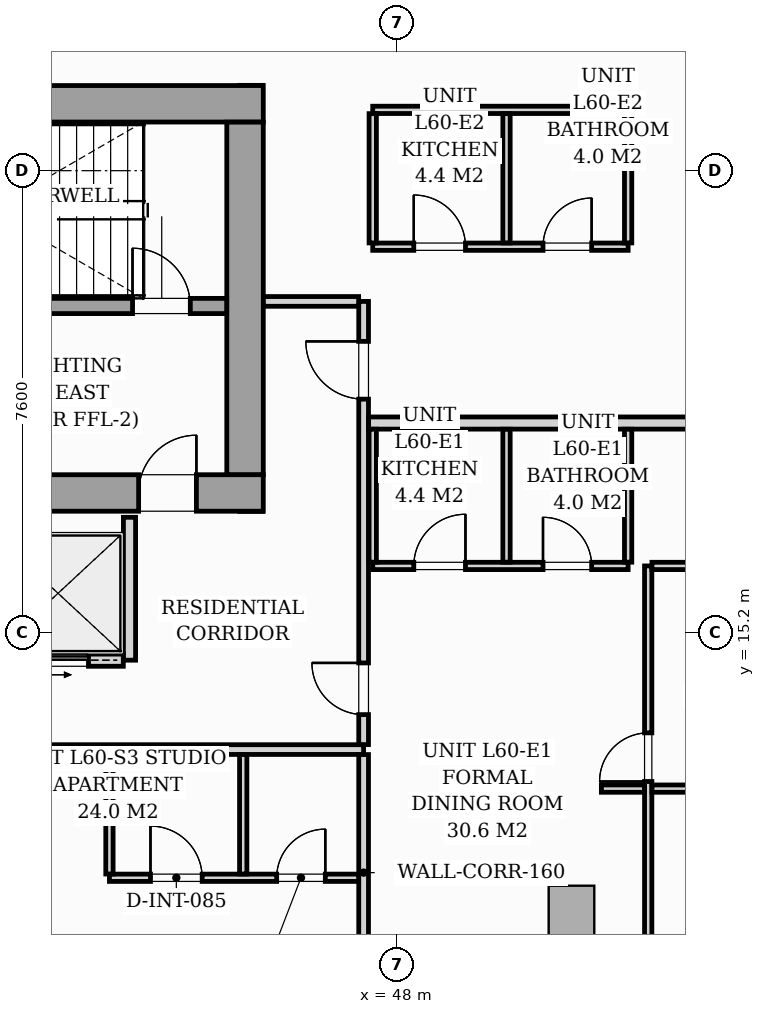
"""IFC4 building model, lengths in metres.
Left out: names, types, materials, properties, quantities, classifications, styles, units other than length and angle.
Written with IfcOpenShell. Run it as: python <this file> out.ifc"""

import sys

from ifc_helpers import new_model, si_unit, direction, frame, frame_2d, origin, origin_2d, place, context, subcontext, project, spatial, rectangle, i_section, extrude, source, transform, mapped, element, fill, save


model = new_model("IFC4")
c1 = context("Model", 3, precision=1e-05, world=origin(), true_north=direction((0.0, 1.0)))
c2 = subcontext(c1, "Body", "Model", "MODEL_VIEW")
j1 = project(units=[si_unit("LENGTHUNIT", "METRE"), si_unit("PLANEANGLEUNIT", "RADIAN")], contexts=[c1])
p1 = place(None, origin())
s1 = spatial("IfcSite", under=j1, at=p1, CompositionType="ELEMENT")
p2 = place(p1, origin())
s2 = spatial("IfcBuilding", under=s1, at=p2, CompositionType="ELEMENT")
p3 = place(p2, frame((0.0, 0.0, 208.2)))
s3 = spatial("IfcBuildingStorey", under=s2, at=p3, CompositionType="ELEMENT", Elevation=208.2)
m1 = source(origin(), c2, "Body", "SweptSolid", [
    extrude(i_section(OverallWidth=0.416, OverallDepth=0.446, WebThickness=0.039, FlangeThickness=0.063, FilletRadius=0.018, at=origin_2d()), origin(), (0.0, 0.0, 1.0), 3.196),
])
for number, where, z_axis, x_axis in (
    (1, (45.6, 17.4, 0.002), (0.0, 0.0, 1.0), (1.0, 0.0, 0.0)),
    (2, (45.6, 24.0, 0.002), (0.0, 0.0, 1.0), (1.0, 0.0, 0.0)),
):
    element("IfcColumn", number, at=place(p3, frame(where, z_axis=z_axis, x_axis=x_axis)), inside=s3, PredefinedType="PILASTER", context=c2, shape_type="MappedRepresentation", body=[
        mapped(m1, transform((0.0, 0.0, 0.0), scale=1.0)),
    ])
m2 = source(origin(), c2, "Body", "SweptSolid", [
    extrude(rectangle(XDim=0.75, YDim=0.95, at=origin_2d()), origin(), (0.0, 0.0, 1.0), 3.194),
])
p4 = place(p3, frame((50.868, 10.566, 0.002), z_axis=(0.0, 0.0, 1.0), x_axis=(0.995396198367, 0.09584575252, 0.0)))
e3 = element("IfcColumn", 3, at=p4, inside=s3, PredefinedType="COLUMN", context=c2, shape_type="MappedRepresentation", body=[
    mapped(m2, transform((0.0, 0.0, 0.0), scale=1.0)),
])
p5 = place(p3, frame((62.963, 10.676, 0.0), z_axis=(0.0, 0.0, 1.0), x_axis=(-0.995395627913, -0.095851676732, 0.0)))
e4 = element("IfcWall", 4, at=p5, inside=s3, PredefinedType="STANDARD", context=c2, shape_type="SweptSolid", body=[
    extrude(rectangle(XDim=16.1, YDim=0.26, at=frame_2d((8.05, 0.0))), origin(), (0.0, 0.0, 1.0), 2.9),
])
p6 = place(p5, frame((7.78, 0.0, 0.0)))
e5 = element("IfcOpeningElement", 5, at=p6, cuts=e4, PredefinedType="OPENING", context=c2, shape_type="SweptSolid", body=[
    extrude(rectangle(XDim=1.8, YDim=2.06, at=frame_2d((0.9, 1.03))), frame((0.0, 0.14, 0.0), z_axis=(0.0, -1.0, 0.0), x_axis=(1.0, 0.0, 0.0)), (0.0, 0.0, 1.0), 0.28),
])
p7 = place(p5, frame((2.05, 0.0, 0.65)))
e6 = element("IfcOpeningElement", 6, at=p7, cuts=e4, PredefinedType="OPENING", context=c2, shape_type="SweptSolid", body=[
    extrude(rectangle(XDim=1.6, YDim=1.5, at=frame_2d((0.8, 0.75))), frame((0.0, 0.14, 0.0), z_axis=(0.0, -1.0, 0.0), x_axis=(1.0, 0.0, 0.0)), (0.0, 0.0, 1.0), 0.28),
])
p8 = place(p3, frame((26.2, 17.5, 0.0), z_axis=(0.0, 0.0, 1.0), x_axis=(1.0, 0.0, 0.0)))
e7 = element("IfcWall", 7, at=p8, inside=s3, PredefinedType="SHEAR", context=c2, shape_type="SweptSolid", body=[
    extrude(rectangle(XDim=19.6, YDim=0.6, at=frame_2d((9.8, 0.0))), origin(), (0.0, 0.0, 1.0), 3.2),
])
p9 = place(p8, frame((0.95, 0.0, 0.0)))
e8 = element("IfcOpeningElement", 8, at=p9, cuts=e7, PredefinedType="OPENING", context=c2, shape_type="SweptSolid", body=[
    extrude(rectangle(XDim=0.95, YDim=2.06, at=frame_2d((0.475, 1.03))), frame((0.0, 0.31, 0.0), z_axis=(0.0, -1.0, 0.0), x_axis=(1.0, 0.0, 0.0)), (0.0, 0.0, 1.0), 0.62),
])
p10 = place(p8, frame((9.38, 0.0, 0.0)))
e9 = element("IfcOpeningElement", 9, at=p10, cuts=e7, PredefinedType="OPENING", context=c2, shape_type="SweptSolid", body=[
    extrude(rectangle(XDim=0.85, YDim=2.0, at=frame_2d((0.425, 1.0))), frame((0.0, 0.31, 0.0), z_axis=(0.0, -1.0, 0.0), x_axis=(1.0, 0.0, 0.0)), (0.0, 0.0, 1.0), 0.62),
])
p11 = place(p8, frame((17.55, 0.0, 0.0)))
e10 = element("IfcOpeningElement", 10, at=p11, cuts=e7, PredefinedType="OPENING", context=c2, shape_type="SweptSolid", body=[
    extrude(rectangle(XDim=0.95, YDim=2.06, at=frame_2d((0.475, 1.03))), frame((0.0, 0.31, 0.0), z_axis=(0.0, -1.0, 0.0), x_axis=(1.0, 0.0, 0.0)), (0.0, 0.0, 1.0), 0.62),
])
p12 = place(p3, frame((26.2, 23.9, 0.0), z_axis=(0.0, 0.0, 1.0), x_axis=(1.0, 0.0, 0.0)))
e11 = element("IfcWall", 11, at=p12, inside=s3, PredefinedType="SHEAR", context=c2, shape_type="SweptSolid", body=[
    extrude(rectangle(XDim=19.6, YDim=0.6, at=frame_2d((9.8, 0.0))), origin(), (0.0, 0.0, 1.0), 3.2),
])
p13 = place(p3, frame((45.5, 17.802, 0.0), z_axis=(0.0, 0.0, 1.0), x_axis=(0.0, 1.0, 0.0)))
e12 = element("IfcWall", 12, at=p13, inside=s3, PredefinedType="SHEAR", context=c2, shape_type="SweptSolid", body=[
    extrude(rectangle(XDim=5.796, YDim=0.6, at=frame_2d((2.898, 0.0))), origin(), (0.0, 0.0, 1.0), 3.2),
])
p14 = place(p3, frame((37.05, 20.575, 0.0), z_axis=(0.0, 0.0, 1.0), x_axis=(1.0, 0.0, 0.0)))
e13 = element("IfcWall", 13, at=p14, inside=s3, PredefinedType="SOLIDWALL", context=c2, shape_type="SweptSolid", body=[
    extrude(rectangle(XDim=8.148, YDim=0.25, at=frame_2d((4.074, 0.0))), origin(), (0.0, 0.0, 1.0), 3.2),
])
p15 = place(p14, frame((6.6, 0.0, 0.0)))
e14 = element("IfcOpeningElement", 14, at=p15, cuts=e13, PredefinedType="OPENING", context=c2, shape_type="SweptSolid", body=[
    extrude(rectangle(XDim=0.95, YDim=2.06, at=frame_2d((0.475, 1.03))), frame((0.0, 0.135, 0.0), z_axis=(0.0, -1.0, 0.0), x_axis=(1.0, 0.0, 0.0)), (0.0, 0.0, 1.0), 0.27),
])
p16 = place(p3, frame((43.6, 14.75, 0.0), z_axis=(0.0, 0.0, 1.0), x_axis=(0.0, 1.0, 0.0)))
e15 = element("IfcWall", 15, at=p16, inside=s3, PredefinedType="PARTITIONING", context=c2, shape_type="SweptSolid", body=[
    extrude(rectangle(XDim=2.35, YDim=0.2, at=frame_2d((1.175, 0.0))), origin(), (0.0, 0.0, 1.0), 2.9),
])
p17 = place(p3, frame((41.352, 14.75, 0.0), z_axis=(0.0, 0.0, 1.0), x_axis=(1.0, 0.0, 0.0)))
e16 = element("IfcWall", 16, at=p17, inside=s3, PredefinedType="PARTITIONING", context=c2, shape_type="SweptSolid", body=[
    extrude(rectangle(XDim=2.146, YDim=0.2, at=frame_2d((1.073, 0.0))), origin(), (0.0, 0.0, 1.0), 2.9),
])
p18 = place(p17, frame((0.523, 0.0, 0.0)))
e17 = element("IfcOpeningElement", 17, at=p18, cuts=e16, PredefinedType="OPENING", context=c2, shape_type="SweptSolid", body=[
    extrude(rectangle(XDim=1.05, YDim=2.08, at=frame_2d((0.525, 1.04))), frame((0.0, 0.11, 0.0), z_axis=(0.0, -1.0, 0.0), x_axis=(1.0, 0.0, 0.0)), (0.0, 0.0, 1.0), 0.22),
])
p19 = place(p3, frame((24.55, 13.28, 0.0), z_axis=(0.0, 0.0, 1.0), x_axis=(1.0, 0.0, 0.0)))
e18 = element("IfcWall", 18, at=p19, inside=s3, PredefinedType="PARTITIONING", context=c2, shape_type="SweptSolid", body=[
    extrude(rectangle(XDim=22.9, YDim=0.16, at=frame_2d((11.45, 0.0))), origin(), (0.0, 0.0, 1.0), 2.9),
])
p20 = place(p19, frame((5.378, 0.0, 0.0)))
e19 = element("IfcOpeningElement", 19, at=p20, cuts=e18, PredefinedType="OPENING", context=c2, shape_type="SweptSolid", body=[
    extrude(rectangle(XDim=0.95, YDim=2.06, at=frame_2d((0.475, 1.03))), frame((0.0, 0.09, 0.0), z_axis=(0.0, -1.0, 0.0), x_axis=(1.0, 0.0, 0.0)), (0.0, 0.0, 1.0), 0.18),
])
p21 = place(p19, frame((13.025, 0.0, 0.0)))
e20 = element("IfcOpeningElement", 20, at=p21, cuts=e18, PredefinedType="OPENING", context=c2, shape_type="SweptSolid", body=[
    extrude(rectangle(XDim=0.95, YDim=2.06, at=frame_2d((0.475, 1.03))), frame((0.0, 0.09, 0.0), z_axis=(0.0, -1.0, 0.0), x_axis=(1.0, 0.0, 0.0)), (0.0, 0.0, 1.0), 0.18),
])
p22 = place(p19, frame((16.572, 0.0, 0.0)))
e21 = element("IfcOpeningElement", 21, at=p22, cuts=e18, PredefinedType="OPENING", context=c2, shape_type="SweptSolid", body=[
    extrude(rectangle(XDim=0.95, YDim=2.06, at=frame_2d((0.475, 1.03))), frame((0.0, 0.09, 0.0), z_axis=(0.0, -1.0, 0.0), x_axis=(1.0, 0.0, 0.0)), (0.0, 0.0, 1.0), 0.18),
])
p23 = place(p3, frame((47.45, 9.315, 0.0), z_axis=(0.0, 0.0, 1.0), x_axis=(0.0, 1.0, 0.0)))
e22 = element("IfcWall", 22, at=p23, inside=s3, PredefinedType="PARTITIONING", context=c2, shape_type="SweptSolid", body=[
    extrude(rectangle(XDim=3.883, YDim=0.16, at=frame_2d((1.941, 0.0))), origin(), (0.0, 0.0, 1.0), 2.9),
])
p24 = place(p3, frame((47.45, 13.362, 0.0), z_axis=(0.0, 0.0, 1.0), x_axis=(0.0, 1.0, 0.0)))
e23 = element("IfcWall", 23, at=p24, inside=s3, PredefinedType="PARTITIONING", context=c2, shape_type="SweptSolid", body=[
    extrude(rectangle(XDim=7.288, YDim=0.16, at=frame_2d((3.644, 0.0))), origin(), (0.0, 0.0, 1.0), 2.9),
])
p25 = place(p24, frame((0.493, 0.0, 0.0)))
e24 = element("IfcOpeningElement", 24, at=p25, cuts=e23, PredefinedType="OPENING", context=c2, shape_type="SweptSolid", body=[
    extrude(rectangle(XDim=0.85, YDim=2.0, at=frame_2d((0.425, 1.0))), frame((0.0, 0.09, 0.0), z_axis=(0.0, -1.0, 0.0), x_axis=(1.0, 0.0, 0.0)), (0.0, 0.0, 1.0), 0.18),
])
p26 = place(p24, frame((5.681, 0.0, 0.0)))
e25 = element("IfcOpeningElement", 25, at=p26, cuts=e23, PredefinedType="OPENING", context=c2, shape_type="SweptSolid", body=[
    extrude(rectangle(XDim=0.95, YDim=2.06, at=frame_2d((0.475, 1.03))), frame((0.0, 0.09, 0.0), z_axis=(0.0, -1.0, 0.0), x_axis=(1.0, 0.0, 0.0)), (0.0, 0.0, 1.0), 0.18),
])
p27 = place(p3, frame((45.802, 20.65, 0.0), z_axis=(0.0, 0.0, 1.0), x_axis=(1.0, 0.0, 0.0)))
e26 = element("IfcWall", 26, at=p27, inside=s3, PredefinedType="PARTITIONING", context=c2, shape_type="SweptSolid", body=[
    extrude(rectangle(XDim=1.566, YDim=0.16, at=frame_2d((0.783, 0.0))), origin(), (0.0, 0.0, 1.0), 2.9),
])
p28 = place(p3, frame((43.27, 11.172, 0.0), z_axis=(0.0, 0.0, 1.0), x_axis=(1.0, 0.0, 0.0)))
e27 = element("IfcWall", 27, at=p28, inside=s3, PredefinedType="PARTITIONING", context=c2, shape_type="SweptSolid", body=[
    extrude(rectangle(XDim=4.098, YDim=0.12, at=frame_2d((2.049, 0.0))), origin(), (0.0, 0.0, 1.0), 2.9),
])
p29 = place(p28, frame((0.675, 0.0, 0.0)))
e28 = element("IfcOpeningElement", 28, at=p29, cuts=e27, PredefinedType="OPENING", context=c2, shape_type="SweptSolid", body=[
    extrude(rectangle(XDim=0.85, YDim=2.05, at=frame_2d((0.425, 1.025))), frame((0.0, 0.07, 0.0), z_axis=(0.0, -1.0, 0.0), x_axis=(1.0, 0.0, 0.0)), (0.0, 0.0, 1.0), 0.14),
])
p30 = place(p28, frame((2.75, 0.0, 0.0)))
e29 = element("IfcOpeningElement", 29, at=p30, cuts=e27, PredefinedType="OPENING", context=c2, shape_type="SweptSolid", body=[
    extrude(rectangle(XDim=0.8, YDim=2.02, at=frame_2d((0.4, 1.01))), frame((0.0, 0.07, 0.0), z_axis=(0.0, -1.0, 0.0), x_axis=(1.0, 0.0, 0.0)), (0.0, 0.0, 1.0), 0.14),
])
for number, where, z_axis, x_axis in (
    (30, (43.27, 11.234, 0.0), (0.0, 0.0, 1.0), (0.0, 1.0, 0.0)),
    (31, (45.47, 11.234, 0.0), (0.0, 0.0, 1.0), (0.0, 1.0, 0.0)),
):
    element("IfcWall", number, at=place(p3, frame(where, z_axis=z_axis, x_axis=x_axis)), inside=s3, PredefinedType="PARTITIONING", context=c2, shape_type="SweptSolid", body=[
        extrude(rectangle(XDim=1.964, YDim=0.12, at=frame_2d((0.982, 0.0))), origin(), (0.0, 0.0, 1.0), 2.9),
    ])
p31 = place(p3, frame((47.532, 18.65, 0.0), z_axis=(0.0, 0.0, 1.0), x_axis=(1.0, 0.0, 0.0)))
e32 = element("IfcWall", 32, at=p31, inside=s3, PredefinedType="PARTITIONING", context=c2, shape_type="SweptSolid", body=[
    extrude(rectangle(XDim=17.095, YDim=0.2, at=frame_2d((8.547, 0.0))), origin(), (0.0, 0.0, 1.0), 2.241),
])
p32 = place(p3, frame((47.6, 16.3, 0.0), z_axis=(0.0, 0.0, 1.0), x_axis=(1.0, 0.0, 0.0)))
e33 = element("IfcWall", 33, at=p32, inside=s3, PredefinedType="PARTITIONING", context=c2, shape_type="SweptSolid", body=[
    extrude(rectangle(XDim=4.2, YDim=0.12, at=frame_2d((2.1, 0.0))), origin(), (0.0, 0.0, 1.0), 2.9),
])
p33 = place(p32, frame((0.675, 0.0, 0.0)))
e34 = element("IfcOpeningElement", 34, at=p33, cuts=e33, PredefinedType="OPENING", context=c2, shape_type="SweptSolid", body=[
    extrude(rectangle(XDim=0.85, YDim=2.05, at=frame_2d((0.425, 1.025))), frame((0.0, 0.07, 0.0), z_axis=(0.0, -1.0, 0.0), x_axis=(1.0, 0.0, 0.0)), (0.0, 0.0, 1.0), 0.14),
])
p34 = place(p32, frame((2.8, 0.0, 0.0)))
e35 = element("IfcOpeningElement", 35, at=p34, cuts=e33, PredefinedType="OPENING", context=c2, shape_type="SweptSolid", body=[
    extrude(rectangle(XDim=0.8, YDim=2.02, at=frame_2d((0.4, 1.01))), frame((0.0, 0.07, 0.0), z_axis=(0.0, -1.0, 0.0), x_axis=(1.0, 0.0, 0.0)), (0.0, 0.0, 1.0), 0.14),
])
for number, where, z_axis, x_axis in (
    (36, (47.6, 16.362, 0.0), (0.0, 0.0, 1.0), (0.0, 1.0, 0.0)),
    (37, (49.8, 16.362, 0.0), (0.0, 0.0, 1.0), (0.0, 1.0, 0.0)),
    (38, (51.8, 16.362, 0.0), (0.0, 0.0, 1.0), (0.0, 1.0, 0.0)),
):
    element("IfcWall", number, at=place(p3, frame(where, z_axis=z_axis, x_axis=x_axis)), inside=s3, PredefinedType="PARTITIONING", context=c2, shape_type="SweptSolid", body=[
        extrude(rectangle(XDim=2.186, YDim=0.12, at=frame_2d((1.093, 0.0))), origin(), (0.0, 0.0, 1.0), 2.9),
    ])
p35 = place(p3, frame((52.13, 9.766, 0.0), z_axis=(0.0, 0.0, 1.0), x_axis=(0.0, 1.0, 0.0)))
e39 = element("IfcWall", 39, at=p35, inside=s3, PredefinedType="PARTITIONING", context=c2, shape_type="SweptSolid", body=[
    extrude(rectangle(XDim=6.534, YDim=0.12, at=frame_2d((3.267, 0.0))), origin(), (0.0, 0.0, 1.0), 2.9),
])
p36 = place(p35, frame((2.989, 0.0, 0.0)))
e40 = element("IfcOpeningElement", 40, at=p36, cuts=e39, PredefinedType="OPENING", context=c2, shape_type="SweptSolid", body=[
    extrude(rectangle(XDim=0.8, YDim=2.0, at=frame_2d((0.4, 1.0))), frame((0.0, 0.07, 0.0), z_axis=(0.0, -1.0, 0.0), x_axis=(1.0, 0.0, 0.0)), (0.0, 0.0, 1.0), 0.14),
])
p37 = place(p3, frame((52.192, 16.3, 0.0), z_axis=(0.0, 0.0, 1.0), x_axis=(1.0, 0.0, 0.0)))
e41 = element("IfcWall", 41, at=p37, inside=s3, PredefinedType="PARTITIONING", context=c2, shape_type="SweptSolid", body=[
    extrude(rectangle(XDim=4.206, YDim=0.12, at=frame_2d((2.103, 0.0))), origin(), (0.0, 0.0, 1.0), 2.9),
])
p38 = place(p3, frame((51.36, 12.638, 0.0), z_axis=(0.0, 0.0, 1.0), x_axis=(1.0, 0.0, 0.0)))
e42 = element("IfcWall", 42, at=p38, inside=s3, PredefinedType="PARTITIONING", context=c2, shape_type="SweptSolid", body=[
    extrude(rectangle(XDim=0.708, YDim=0.12, at=frame_2d((0.354, 0.0))), origin(), (0.0, 0.0, 1.0), 2.9),
])
p39 = place(p3, frame((52.192, 12.638, 0.0), z_axis=(0.0, 0.0, 1.0), x_axis=(1.0, 0.0, 0.0)))
e43 = element("IfcWall", 43, at=p39, inside=s3, PredefinedType="PARTITIONING", context=c2, shape_type="SweptSolid", body=[
    extrude(rectangle(XDim=4.206, YDim=0.12, at=frame_2d((2.103, 0.0))), origin(), (0.0, 0.0, 1.0), 2.9),
])
p40 = place(p3, frame((47.6, 21.55, 0.0), z_axis=(0.0, 0.0, 1.0), x_axis=(1.0, 0.0, 0.0)))
e44 = element("IfcWall", 44, at=p40, inside=s3, PredefinedType="PARTITIONING", context=c2, shape_type="SweptSolid", body=[
    extrude(rectangle(XDim=4.2, YDim=0.12, at=frame_2d((2.1, 0.0))), origin(), (0.0, 0.0, 1.0), 2.9),
])
p41 = place(p40, frame((0.675, 0.0, 0.0)))
e45 = element("IfcOpeningElement", 45, at=p41, cuts=e44, PredefinedType="OPENING", context=c2, shape_type="SweptSolid", body=[
    extrude(rectangle(XDim=0.85, YDim=2.05, at=frame_2d((0.425, 1.025))), frame((0.0, 0.07, 0.0), z_axis=(0.0, -1.0, 0.0), x_axis=(1.0, 0.0, 0.0)), (0.0, 0.0, 1.0), 0.14),
])
p42 = place(p40, frame((2.8, 0.0, 0.0)))
e46 = element("IfcOpeningElement", 46, at=p42, cuts=e44, PredefinedType="OPENING", context=c2, shape_type="SweptSolid", body=[
    extrude(rectangle(XDim=0.8, YDim=2.0, at=frame_2d((0.4, 1.0))), frame((0.0, 0.07, 0.0), z_axis=(0.0, -1.0, 0.0), x_axis=(1.0, 0.0, 0.0)), (0.0, 0.0, 1.0), 0.14),
])
p43 = place(p3, frame((47.6, 23.8, 0.0), z_axis=(0.0, 0.0, 1.0), x_axis=(1.0, 0.0, 0.0)))
e47 = element("IfcWall", 47, at=p43, inside=s3, PredefinedType="PARTITIONING", context=c2, shape_type="SweptSolid", body=[
    extrude(rectangle(XDim=4.2, YDim=0.12, at=frame_2d((2.1, 0.0))), origin(), (0.0, 0.0, 1.0), 2.9),
])
for number, where, z_axis, x_axis in (
    (48, (47.6, 21.612, 0.0), (0.0, 0.0, 1.0), (0.0, 1.0, 0.0)),
    (49, (49.8, 21.612, 0.0), (0.0, 0.0, 1.0), (0.0, 1.0, 0.0)),
    (50, (51.8, 21.612, 0.0), (0.0, 0.0, 1.0), (0.0, 1.0, 0.0)),
):
    element("IfcWall", number, at=place(p3, frame(where, z_axis=z_axis, x_axis=x_axis)), inside=s3, PredefinedType="PARTITIONING", context=c2, shape_type="SweptSolid", body=[
        extrude(rectangle(XDim=2.126, YDim=0.12, at=frame_2d((1.063, 0.0))), origin(), (0.0, 0.0, 1.0), 2.9),
    ])
m3 = source(origin(), c2, "Body", "SweptSolid", [
    extrude(rectangle(XDim=0.95, YDim=2.06, at=frame_2d((0.475, 1.03))), frame((0.0, 0.025, 0.0), z_axis=(0.0, -1.0, 0.0), x_axis=(1.0, 0.0, 0.0)), (0.0, 0.0, 1.0), 0.05),
])
p44 = place(p11, origin())
e51 = element("IfcDoor", 51, at=p44, inside=s3, OperationType="SINGLE_SWING_RIGHT", PredefinedType="DOOR", context=c2, shape_type="MappedRepresentation", body=[
    mapped(m3, transform((0.0, 0.0, 0.0), scale=1.0)),
])
fill(e10, e51)
p45 = place(p15, origin())
e52 = element("IfcDoor", 52, at=p45, inside=s3, OperationType="SINGLE_SWING_LEFT", PredefinedType="DOOR", context=c2, shape_type="MappedRepresentation", body=[
    mapped(m3, transform((0.0, 0.0, 0.0), scale=1.0)),
])
fill(e14, e52)
m4 = source(origin(), c2, "Body", "SweptSolid", [
    extrude(rectangle(XDim=1.05, YDim=2.08, at=frame_2d((0.525, 1.04))), frame((0.0, 0.025, 0.0), z_axis=(0.0, -1.0, 0.0), x_axis=(1.0, 0.0, 0.0)), (0.0, 0.0, 1.0), 0.05),
])
p46 = place(p18, origin())
e53 = element("IfcDoor", 53, at=p46, inside=s3, OperationType="SLIDING_TO_RIGHT", PredefinedType="DOOR", context=c2, shape_type="MappedRepresentation", body=[
    mapped(m4, transform((0.0, 0.0, 0.0), scale=1.0)),
])
fill(e17, e53)
m5 = source(origin(), c2, "Body", "SweptSolid", [
    extrude(rectangle(XDim=0.85, YDim=2.05, at=frame_2d((0.425, 1.025))), frame((0.0, 0.025, 0.0), z_axis=(0.0, -1.0, 0.0), x_axis=(1.0, 0.0, 0.0)), (0.0, 0.0, 1.0), 0.05),
])
p47 = place(p29, origin())
e54 = element("IfcDoor", 54, at=p47, inside=s3, OperationType="SINGLE_SWING_LEFT", PredefinedType="DOOR", context=c2, shape_type="MappedRepresentation", body=[
    mapped(m5, transform((0.0, 0.0, 0.0), scale=1.0)),
])
fill(e28, e54)
m6 = source(origin(), c2, "Body", "SweptSolid", [
    extrude(rectangle(XDim=0.8, YDim=2.02, at=frame_2d((0.4, 1.01))), frame((0.0, 0.025, 0.0), z_axis=(0.0, -1.0, 0.0), x_axis=(1.0, 0.0, 0.0)), (0.0, 0.0, 1.0), 0.05),
])
p48 = place(p30, origin())
e55 = element("IfcDoor", 55, at=p48, inside=s3, OperationType="SINGLE_SWING_RIGHT", PredefinedType="DOOR", context=c2, shape_type="MappedRepresentation", body=[
    mapped(m6, transform((0.0, 0.0, 0.0), scale=1.0)),
])
fill(e29, e55)
m7 = source(origin(), c2, "Body", "SweptSolid", [
    extrude(rectangle(XDim=0.85, YDim=2.0, at=frame_2d((0.425, 1.0))), frame((0.0, 0.025, 0.0), z_axis=(0.0, -1.0, 0.0), x_axis=(1.0, 0.0, 0.0)), (0.0, 0.0, 1.0), 0.05),
])
p49 = place(p25, origin())
e56 = element("IfcDoor", 56, at=p49, inside=s3, OperationType="SINGLE_SWING_RIGHT", PredefinedType="DOOR", context=c2, shape_type="MappedRepresentation", body=[
    mapped(m7, transform((0.0, 0.0, 0.0), scale=1.0)),
])
fill(e24, e56)
m8 = source(origin(), c2, "Body", "SweptSolid", [
    extrude(rectangle(XDim=0.8, YDim=2.0, at=frame_2d((0.4, 1.0))), frame((0.0, 0.025, 0.0), z_axis=(0.0, -1.0, 0.0), x_axis=(1.0, 0.0, 0.0)), (0.0, 0.0, 1.0), 0.05),
])
p50 = place(p36, origin())
e57 = element("IfcDoor", 57, at=p50, inside=s3, OperationType="SINGLE_SWING_LEFT", PredefinedType="DOOR", context=c2, shape_type="MappedRepresentation", body=[
    mapped(m8, transform((0.0, 0.0, 0.0), scale=1.0)),
])
fill(e40, e57)
p51 = place(p33, origin())
e58 = element("IfcDoor", 58, at=p51, inside=s3, OperationType="SINGLE_SWING_RIGHT", PredefinedType="DOOR", context=c2, shape_type="MappedRepresentation", body=[
    mapped(m5, transform((0.0, 0.0, 0.0), scale=1.0)),
])
fill(e34, e58)
p52 = place(p34, origin())
e59 = element("IfcDoor", 59, at=p52, inside=s3, OperationType="SINGLE_SWING_LEFT", PredefinedType="DOOR", context=c2, shape_type="MappedRepresentation", body=[
    mapped(m6, transform((0.0, 0.0, 0.0), scale=1.0)),
])
fill(e35, e59)
m9 = source(origin(), c2, "Body", "SweptSolid", [
    extrude(rectangle(XDim=0.95, YDim=2.06, at=frame_2d((0.475, 1.03))), frame((0.0, 0.025, 0.0), z_axis=(0.0, -1.0, 0.0), x_axis=(1.0, 0.0, 0.0)), (0.0, 0.0, 1.0), 0.05),
])
p53 = place(p26, origin())
e60 = element("IfcDoor", 60, at=p53, inside=s3, OperationType="SINGLE_SWING_RIGHT", PredefinedType="DOOR", context=c2, shape_type="MappedRepresentation", body=[
    mapped(m9, transform((0.0, 0.0, 0.0), scale=1.0)),
])
fill(e25, e60)
p54 = place(p41, origin())
e61 = element("IfcDoor", 61, at=p54, inside=s3, OperationType="SINGLE_SWING_LEFT", PredefinedType="DOOR", context=c2, shape_type="MappedRepresentation", body=[
    mapped(m5, transform((0.0, 0.0, 0.0), scale=1.0)),
])
fill(e45, e61)
p55 = place(p42, origin())
e62 = element("IfcDoor", 62, at=p55, inside=s3, OperationType="SINGLE_SWING_RIGHT", PredefinedType="DOOR", context=c2, shape_type="MappedRepresentation", body=[
    mapped(m8, transform((0.0, 0.0, 0.0), scale=1.0)),
])
fill(e46, e62)
save(model, sys.argv[1])
